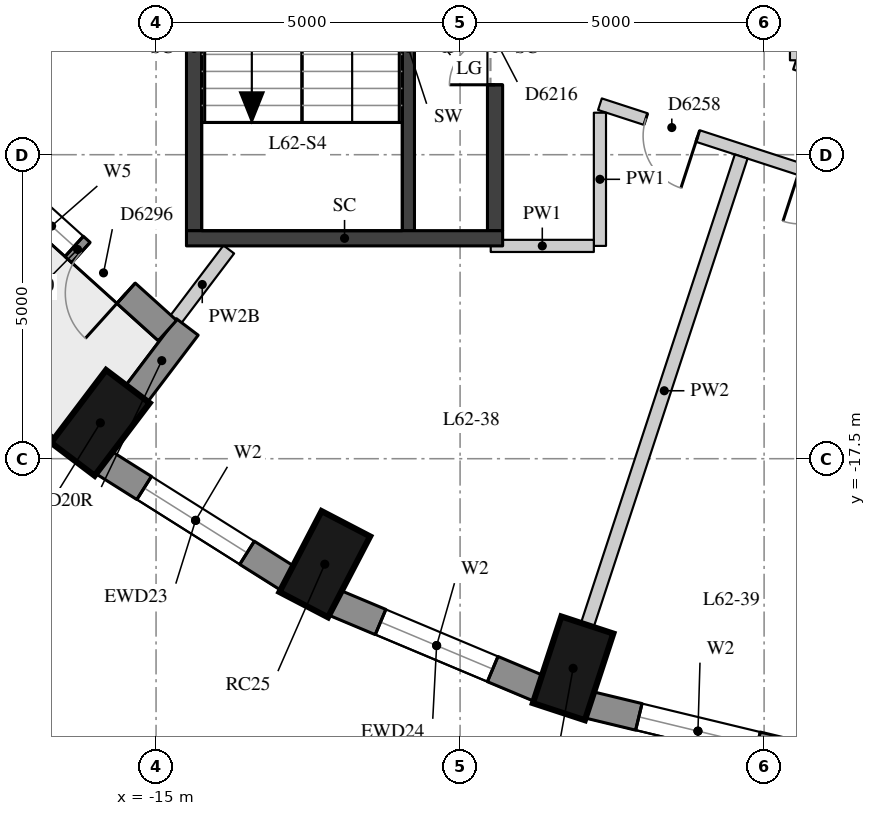
"""IFC4 building model, lengths in metres.
Left out: names, types, materials, properties, quantities, classifications, styles, units other than length and angle.
Written with IfcOpenShell. Run it as: python <this file> out.ifc"""

import sys

from ifc_helpers import new_model, si_unit, direction, frame, frame_2d, origin, origin_2d, place, context, subcontext, project, spatial, rectangle, extrude, element, fill, save


model = new_model("IFC4")
c1 = context("Model", 3, precision=1e-05, world=origin(), true_north=direction((0.0, 1.0)))
c2 = subcontext(c1, "Body", "Model", "MODEL_VIEW")
j1 = project(units=[si_unit("LENGTHUNIT", "METRE"), si_unit("PLANEANGLEUNIT", "RADIAN")], contexts=[c1])
p1 = place(None, origin())
s1 = spatial("IfcSite", under=j1, at=p1, CompositionType="ELEMENT")
p2 = place(p1, origin())
s2 = spatial("IfcBuilding", under=s1, at=p2, CompositionType="ELEMENT")
p3 = place(p2, frame((0.0, 0.0, 218.9)))
s3 = spatial("IfcBuildingStorey", under=s2, at=p3, CompositionType="ELEMENT", Elevation=218.9)
for number, where, z_axis, x_axis in (
    (1, (-15.916, -16.911, 0.0), (0.0, 0.0, 1.0), (-0.604, -0.797, 0.0)),
    (2, (-12.225, -19.235, 0.0), (0.0, 0.0, 1.0), (-0.462, -0.887, 0.0)),
    (3, (-8.141, -20.948, 0.0), (0.0, 0.0, 1.0), (-0.312, -0.95, 0.0)),
):
    element("IfcColumn", number, at=place(p3, frame(where, z_axis=z_axis, x_axis=x_axis)), inside=s3, PredefinedType="COLUMN", context=c2, shape_type="SweptSolid", body=[
        extrude(rectangle(XDim=1.5, YDim=0.9, at=origin_2d()), origin(), (0.0, 0.0, 1.0), 3.3),
    ])
p4 = place(p3, frame((-15.867, -17.559, 0.0), z_axis=(0.0, 0.0, 1.0), x_axis=(0.84616917791, -0.532914366813, 0.0)))
e4 = element("IfcWall", 4, at=p4, inside=s3, PredefinedType="SOLIDWALL", context=c2, shape_type="SweptSolid", body=[
    extrude(rectangle(XDim=3.587, YDim=0.45, at=frame_2d((1.793, 0.0))), origin(), (0.0, 0.0, 1.0), 3.02),
])
p5 = place(p4, frame((0.793, 0.0, 0.4)))
e5 = element("IfcOpeningElement", 5, at=p5, cuts=e4, PredefinedType="OPENING", context=c2, shape_type="SweptSolid", body=[
    extrude(rectangle(XDim=2.0, YDim=1.75, at=frame_2d((1.0, 0.875))), frame((0.0, 0.235, 0.0), z_axis=(0.0, -1.0, 0.0), x_axis=(1.0, 0.0, 0.0)), (0.0, 0.0, 1.0), 0.47),
])
p6 = place(p3, frame((-12.069, -19.867, 0.0), z_axis=(0.0, 0.0, 1.0), x_axis=(0.922168222612, -0.386789050006, 0.0)))
e6 = element("IfcWall", 6, at=p6, inside=s3, PredefinedType="SOLIDWALL", context=c2, shape_type="SweptSolid", body=[
    extrude(rectangle(XDim=3.651, YDim=0.45, at=frame_2d((1.825, 0.0))), origin(), (0.0, 0.0, 1.0), 3.02),
])
p7 = place(p6, frame((0.825, 0.0, 0.4)))
e7 = element("IfcOpeningElement", 7, at=p7, cuts=e6, PredefinedType="OPENING", context=c2, shape_type="SweptSolid", body=[
    extrude(rectangle(XDim=2.0, YDim=1.75, at=frame_2d((1.0, 0.875))), frame((0.0, 0.235, 0.0), z_axis=(0.0, -1.0, 0.0), x_axis=(1.0, 0.0, 0.0)), (0.0, 0.0, 1.0), 0.47),
])
p8 = place(p3, frame((-7.885, -21.547, 0.0), z_axis=(0.0, 0.0, 1.0), x_axis=(0.9721584944, -0.234324266275, 0.0)))
e8 = element("IfcWall", 8, at=p8, inside=s3, PredefinedType="SOLIDWALL", context=c2, shape_type="SweptSolid", body=[
    extrude(rectangle(XDim=3.698, YDim=0.45, at=frame_2d((1.849, 0.0))), origin(), (0.0, 0.0, 1.0), 3.02),
])
p9 = place(p8, frame((0.849, 0.0, 0.4)))
e9 = element("IfcOpeningElement", 9, at=p9, cuts=e8, PredefinedType="OPENING", context=c2, shape_type="SweptSolid", body=[
    extrude(rectangle(XDim=2.0, YDim=1.75, at=frame_2d((1.0, 0.875))), frame((0.0, 0.235, 0.0), z_axis=(0.0, -1.0, 0.0), x_axis=(1.0, 0.0, 0.0)), (0.0, 0.0, 1.0), 0.47),
])
p10 = place(p3, frame((-15.326, -16.442, 0.0), z_axis=(0.0, 0.0, 1.0), x_axis=(0.603644757989, 0.797253414011, 0.0)))
e10 = element("IfcWall", 10, at=p10, inside=s3, PredefinedType="SOLIDWALL", context=c2, shape_type="SweptSolid", body=[
    extrude(rectangle(XDim=1.391, YDim=0.45, at=frame_2d((0.695, 0.0))), origin(), (0.0, 0.0, 1.0), 2.57),
])
p11 = place(p3, frame((-17.769, -12.725, 0.0), z_axis=(0.0, 0.0, 1.0), x_axis=(0.742485377568, -0.669862272484, 0.0)))
e11 = element("IfcWall", 11, at=p11, inside=s3, PredefinedType="SOLIDWALL", context=c2, shape_type="SweptSolid", body=[
    extrude(rectangle(XDim=3.98, YDim=0.45, at=frame_2d((1.99, 0.0))), origin(), (0.0, 0.0, 1.0), 3.02),
])
p12 = place(p11, frame((0.915, 0.0, 0.4)))
e12 = element("IfcOpeningElement", 12, at=p12, cuts=e11, PredefinedType="OPENING", context=c2, shape_type="SweptSolid", body=[
    extrude(rectangle(XDim=1.0, YDim=1.75, at=frame_2d((0.5, 0.875))), frame((0.0, 0.235, 0.0), z_axis=(0.0, -1.0, 0.0), x_axis=(1.0, 0.0, 0.0)), (0.0, 0.0, 1.0), 0.47),
])
p13 = place(p11, frame((2.065, 0.0, 0.0)))
e13 = element("IfcOpeningElement", 13, at=p13, cuts=e11, PredefinedType="OPENING", context=c2, shape_type="SweptSolid", body=[
    extrude(rectangle(XDim=1.0, YDim=2.15, at=frame_2d((0.5, 1.075))), frame((0.0, 0.235, 0.0), z_axis=(0.0, -1.0, 0.0), x_axis=(1.0, 0.0, 0.0)), (0.0, 0.0, 1.0), 0.47),
])
p14 = place(p3, frame((-10.85, -13.75, 0.0), z_axis=(0.0, 0.0, 1.0), x_axis=(0.0, 1.0, 0.0)))
e14 = element("IfcWall", 14, at=p14, inside=s3, PredefinedType="SHEAR", context=c2, shape_type="SweptSolid", body=[
    extrude(rectangle(XDim=6.0, YDim=0.2, at=frame_2d((3.0, 0.0))), origin(), (0.0, 0.0, 1.0), 3.02),
])
p15 = place(p14, frame((4.4, 0.0, 0.0)))
e15 = element("IfcOpeningElement", 15, at=p15, cuts=e14, PredefinedType="OPENING", context=c2, shape_type="SweptSolid", body=[
    extrude(rectangle(XDim=1.5, YDim=2.1, at=frame_2d((0.75, 1.05))), frame((0.0, 0.11, 0.0), z_axis=(0.0, -1.0, 0.0), x_axis=(1.0, 0.0, 0.0)), (0.0, 0.0, 1.0), 0.22),
])
p16 = place(p3, frame((-14.375, -13.75, -0.28), z_axis=(0.0, 0.0, 1.0), x_axis=(0.0, 1.0, 0.0)))
e16 = element("IfcWall", 16, at=p16, inside=s3, PredefinedType="SHEAR", context=c2, shape_type="SweptSolid", body=[
    extrude(rectangle(XDim=6.0, YDim=0.25, at=frame_2d((3.0, 0.0))), origin(), (0.0, 0.0, 1.0), 3.3),
])
p17 = place(p3, frame((-9.425, -13.75, -0.28), z_axis=(0.0, 0.0, 1.0), x_axis=(0.0, 1.0, 0.0)))
e17 = element("IfcWall", 17, at=p17, inside=s3, PredefinedType="SHEAR", context=c2, shape_type="SweptSolid", body=[
    extrude(rectangle(XDim=6.0, YDim=0.25, at=frame_2d((3.0, 0.0))), origin(), (0.0, 0.0, 1.0), 3.3),
])
p18 = place(p17, frame((2.4, 0.0, 0.28)))
e18 = element("IfcOpeningElement", 18, at=p18, cuts=e17, PredefinedType="OPENING", context=c2, shape_type="SweptSolid", body=[
    extrude(rectangle(XDim=1.5, YDim=2.1, at=frame_2d((0.75, 1.05))), frame((0.0, 0.135, 0.0), z_axis=(0.0, -1.0, 0.0), x_axis=(1.0, 0.0, 0.0)), (0.0, 0.0, 1.0), 0.27),
])
p19 = place(p3, frame((-14.5, -13.875, -0.28), z_axis=(0.0, 0.0, 1.0), x_axis=(1.0, 0.0, 0.0)))
e19 = element("IfcWall", 19, at=p19, inside=s3, PredefinedType="SHEAR", context=c2, shape_type="SweptSolid", body=[
    extrude(rectangle(XDim=5.2, YDim=0.25, at=frame_2d((2.6, 0.0))), origin(), (0.0, 0.0, 1.0), 3.3),
])
p20 = place(p3, frame((0.605, -14.369, 0.0), z_axis=(0.0, 0.0, 1.0), x_axis=(-0.950994614205, 0.309207444529, 0.0)))
e20 = element("IfcWall", 20, at=p20, inside=s3, PredefinedType="PARTITIONING", context=c2, shape_type="SweptSolid", body=[
    extrude(rectangle(XDim=8.733, YDim=0.2, at=frame_2d((4.366, 0.0))), origin(), (0.0, 0.0, 1.0), 3.02),
])
p21 = place(p20, frame((7.04, 0.0, 0.0)))
e21 = element("IfcOpeningElement", 21, at=p21, cuts=e20, PredefinedType="OPENING", context=c2, shape_type="SweptSolid", body=[
    extrude(rectangle(XDim=0.9, YDim=2.1, at=frame_2d((0.45, 1.05))), frame((0.0, 0.11, 0.0), z_axis=(0.0, -1.0, 0.0), x_axis=(1.0, 0.0, 0.0)), (0.0, 0.0, 1.0), 0.22),
])
p22 = place(p20, frame((4.375, 0.0, 0.0)))
e22 = element("IfcOpeningElement", 22, at=p22, cuts=e20, PredefinedType="OPENING", context=c2, shape_type="SweptSolid", body=[
    extrude(rectangle(XDim=0.9, YDim=2.1, at=frame_2d((0.45, 1.05))), frame((0.0, 0.11, 0.0), z_axis=(0.0, -1.0, 0.0), x_axis=(1.0, 0.0, 0.0)), (0.0, 0.0, 1.0), 0.22),
])
p23 = place(p20, frame((1.145, 0.0, 0.0)))
e23 = element("IfcOpeningElement", 23, at=p23, cuts=e20, PredefinedType="OPENING", context=c2, shape_type="SweptSolid", body=[
    extrude(rectangle(XDim=0.9, YDim=2.1, at=frame_2d((0.45, 1.05))), frame((0.0, 0.11, 0.0), z_axis=(0.0, -1.0, 0.0), x_axis=(1.0, 0.0, 0.0)), (0.0, 0.0, 1.0), 0.22),
])
p24 = place(p3, frame((-7.7, -11.809, 0.0), z_axis=(0.0, 0.0, 1.0), x_axis=(0.0, -1.0, 0.0)))
e24 = element("IfcWall", 24, at=p24, inside=s3, PredefinedType="PARTITIONING", context=c2, shape_type="SweptSolid", body=[
    extrude(rectangle(XDim=2.191, YDim=0.2, at=frame_2d((1.095, 0.0))), origin(), (0.0, 0.0, 1.0), 3.02),
])
p25 = place(p3, frame((-7.8, -14.0, 0.0), z_axis=(0.0, 0.0, 1.0), x_axis=(-1.0, 0.0, 0.0)))
e25 = element("IfcWall", 25, at=p25, inside=s3, PredefinedType="PARTITIONING", context=c2, shape_type="SweptSolid", body=[
    extrude(rectangle(XDim=1.696, YDim=0.2, at=frame_2d((0.848, 0.0))), origin(), (0.0, 0.0, 1.0), 3.02),
])
p26 = place(p3, frame((0.705, -12.7, 0.0), z_axis=(0.0, 0.0, 1.0), x_axis=(-0.952035530576, 0.305987497327, 0.0)))
e26 = element("IfcWall", 26, at=p26, inside=s3, PredefinedType="PARTITIONING", context=c2, shape_type="SweptSolid", body=[
    extrude(rectangle(XDim=5.467, YDim=0.15, at=frame_2d((2.733, 0.0))), origin(), (0.0, 0.0, 1.0), 3.02),
])
p27 = place(p3, frame((-4.5, -10.947, 0.0), z_axis=(0.0, 0.0, 1.0), x_axis=(0.0, 1.0, 0.0)))
e27 = element("IfcWall", 27, at=p27, inside=s3, PredefinedType="PARTITIONING", context=c2, shape_type="SweptSolid", body=[
    extrude(rectangle(XDim=3.085, YDim=0.15, at=frame_2d((1.542, 0.0))), origin(), (0.0, 0.0, 1.0), 3.02),
])
p28 = place(p3, frame((-14.677, -15.211, 0.0), z_axis=(0.0, 0.0, 1.0), x_axis=(0.60355868562, 0.797318576864, 0.0)))
e28 = element("IfcWall", 28, at=p28, inside=s3, PredefinedType="PARTITIONING", context=c2, shape_type="SweptSolid", body=[
    extrude(rectangle(XDim=1.447, YDim=0.22, at=frame_2d((0.723, 0.0))), origin(), (0.0, 0.0, 1.0), 2.57),
])
p29 = place(p3, frame((-7.907, -20.235, 0.0), z_axis=(0.0, 0.0, 1.0), x_axis=(0.311998426629, 0.950082618397, 0.0)))
e29 = element("IfcWall", 29, at=p29, inside=s3, PredefinedType="PARTITIONING", context=c2, shape_type="SweptSolid", body=[
    extrude(rectangle(XDim=8.111, YDim=0.22, at=frame_2d((4.055, 0.0))), origin(), (0.0, 0.0, 1.0), 3.02),
])
p30 = place(p5, origin())
e30 = element("IfcWindow", 30, at=p30, inside=s3, PartitioningType="SINGLE_PANEL", PredefinedType="WINDOW", context=c2, shape_type="SweptSolid", body=[
    extrude(rectangle(XDim=2.0, YDim=1.75, at=frame_2d((1.0, 0.875))), frame((0.0, 0.035, 0.0), z_axis=(0.0, -1.0, 0.0), x_axis=(1.0, 0.0, 0.0)), (0.0, 0.0, 1.0), 0.06),
])
fill(e5, e30)
p31 = place(p7, origin())
e31 = element("IfcWindow", 31, at=p31, inside=s3, PartitioningType="SINGLE_PANEL", PredefinedType="WINDOW", context=c2, shape_type="SweptSolid", body=[
    extrude(rectangle(XDim=2.0, YDim=1.75, at=frame_2d((1.0, 0.875))), frame((0.0, 0.035, 0.0), z_axis=(0.0, -1.0, 0.0), x_axis=(1.0, 0.0, 0.0)), (0.0, 0.0, 1.0), 0.06),
])
fill(e7, e31)
p32 = place(p9, origin())
e32 = element("IfcWindow", 32, at=p32, inside=s3, PartitioningType="SINGLE_PANEL", PredefinedType="WINDOW", context=c2, shape_type="SweptSolid", body=[
    extrude(rectangle(XDim=2.0, YDim=1.75, at=frame_2d((1.0, 0.875))), frame((0.0, 0.035, 0.0), z_axis=(0.0, -1.0, 0.0), x_axis=(1.0, 0.0, 0.0)), (0.0, 0.0, 1.0), 0.06),
])
fill(e9, e32)
p33 = place(p12, origin())
e33 = element("IfcWindow", 33, at=p33, inside=s3, PartitioningType="SINGLE_PANEL", PredefinedType="WINDOW", context=c2, shape_type="SweptSolid", body=[
    extrude(rectangle(XDim=1.0, YDim=1.75, at=frame_2d((0.5, 0.875))), frame((0.0, 0.035, 0.0), z_axis=(0.0, -1.0, 0.0), x_axis=(1.0, 0.0, 0.0)), (0.0, 0.0, 1.0), 0.06),
])
fill(e12, e33)
p34 = place(p13, frame((1.0, 0.0, 0.0), z_axis=(0.0, 0.0, 1.0), x_axis=(-1.0, 0.0, 0.0)))
e34 = element("IfcDoor", 34, at=p34, inside=s3, OperationType="SINGLE_SWING_LEFT", PredefinedType="DOOR", context=c2, shape_type="SweptSolid", body=[
    extrude(rectangle(XDim=1.0, YDim=2.15, at=frame_2d((0.5, 1.075))), frame((0.0, 0.075, 0.0), z_axis=(0.0, -1.0, 0.0), x_axis=(1.0, 0.0, 0.0)), (0.0, 0.0, 1.0), 0.05),
])
fill(e13, e34)
p35 = place(p18, origin())
e35 = element("IfcDoor", 35, at=p35, inside=s3, OperationType="DOUBLE_DOOR_SINGLE_SWING", PredefinedType="DOOR", context=c2, shape_type="SweptSolid", body=[
    extrude(rectangle(XDim=1.5, YDim=2.1, at=frame_2d((0.75, 1.05))), frame((0.0, 0.025, 0.0), z_axis=(0.0, -1.0, 0.0), x_axis=(1.0, 0.0, 0.0)), (0.0, 0.0, 1.0), 0.05),
])
fill(e18, e35)
p36 = place(p21, origin())
e36 = element("IfcDoor", 36, at=p36, inside=s3, OperationType="SINGLE_SWING_LEFT", PredefinedType="DOOR", context=c2, shape_type="SweptSolid", body=[
    extrude(rectangle(XDim=0.9, YDim=2.1, at=frame_2d((0.45, 1.05))), frame((0.0, 0.025, 0.0), z_axis=(0.0, -1.0, 0.0), x_axis=(1.0, 0.0, 0.0)), (0.0, 0.0, 1.0), 0.05),
])
fill(e21, e36)
save(model, sys.argv[1])
